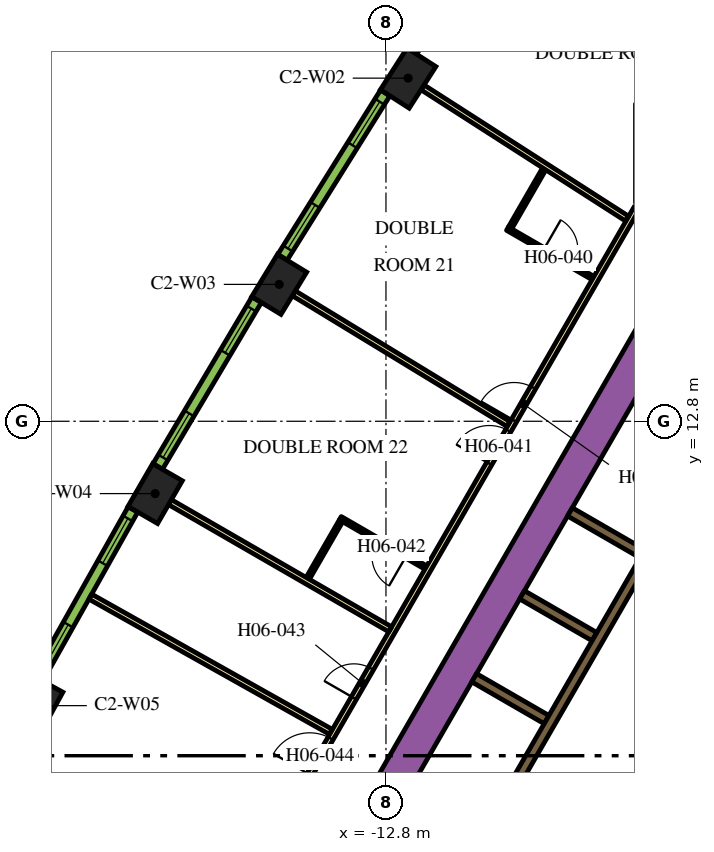
"""IFC4 building model, lengths in metres.
Left out: names, types, materials, properties, quantities, classifications, styles, units other than length and angle.
Written with IfcOpenShell. Run it as: python <this file> out.ifc"""

import sys

from ifc_helpers import new_model, si_unit, direction, frame, frame_2d, origin, origin_2d, place, context, subcontext, project, spatial, rectangle, extrude, element, fill, save


model = new_model("IFC4")
c1 = context("Model", 3, precision=1e-05, world=origin(), true_north=direction((0.0, 1.0)))
c2 = subcontext(c1, "Body", "Model", "MODEL_VIEW")
j1 = project(units=[si_unit("LENGTHUNIT", "METRE"), si_unit("PLANEANGLEUNIT", "RADIAN")], contexts=[c1])
p1 = place(None, origin())
s1 = spatial("IfcSite", under=j1, at=p1, CompositionType="ELEMENT")
p2 = place(p1, origin())
s2 = spatial("IfcBuilding", under=s1, at=p2, CompositionType="ELEMENT")
p3 = place(p2, frame((0.0, 0.0, 83.7)))
s3 = spatial("IfcBuildingStorey", under=s2, at=p3, CompositionType="ELEMENT", Elevation=83.7)
for number, where, z_axis, x_axis in (
    (1, (-12.217, 21.828, 0.0), (0.0, 0.0, 1.0), (-0.54, -0.842, 0.0)),
    (2, (-15.609, 16.402, 0.0), (0.0, 0.0, 1.0), (-0.52, -0.854, 0.0)),
    (3, (-18.874, 10.897, 0.0), (0.0, 0.0, 1.0), (-0.5, -0.866, 0.0)),
    (4, (-22.009, 5.317, 0.0), (0.0, 0.0, 1.0), (-0.48, -0.877, 0.0)),
):
    element("IfcColumn", number, at=place(p3, frame(where, z_axis=z_axis, x_axis=x_axis)), inside=s3, PredefinedType="COLUMN", context=c2, shape_type="SweptSolid", body=[
        extrude(rectangle(XDim=1.3, YDim=0.9, at=origin_2d()), origin(), (0.0, 0.0, 1.0), 3.9),
    ])
p4 = place(p3, frame((-15.36, -1.503, 0.0), z_axis=(0.0, 0.0, 1.0), x_axis=(0.50000389221, 0.866023156604, 0.0)))
e5 = element("IfcWall", 5, at=p4, inside=s3, PredefinedType="SOLIDWALL", context=c2, shape_type="SweptSolid", body=[
    extrude(rectangle(XDim=21.0, YDim=0.9, at=frame_2d((10.5, 0.0))), origin(), (0.0, 0.0, 1.0), 3.9),
])
p5 = place(p3, frame((-8.06, -1.311, 0.0), z_axis=(0.0, 0.0, 1.0), x_axis=(0.50000273126, 0.866023826885, 0.0)))
e6 = element("IfcWall", 6, at=p5, inside=s3, PredefinedType="SOLIDWALL", context=c2, shape_type="SweptSolid", body=[
    extrude(rectangle(XDim=10.33, YDim=0.25, at=frame_2d((5.165, 0.0))), origin(), (0.0, 0.0, 1.0), 3.9),
])
for number, where, z_axis, x_axis in (
    (7, (-8.574, 4.95, 0.0), (0.0, 0.0, 1.0), (-0.866, 0.5, 0.0)),
    (8, (-7.314, 7.132, 0.0), (0.0, 0.0, 1.0), (-0.866, 0.5, 0.0)),
):
    element("IfcWall", number, at=place(p3, frame(where, z_axis=z_axis, x_axis=x_axis)), inside=s3, PredefinedType="SOLIDWALL", context=c2, shape_type="SweptSolid", body=[
        extrude(rectangle(XDim=2.2, YDim=0.25, at=frame_2d((1.1, 0.0))), origin(), (0.0, 0.0, 1.0), 3.9),
    ])
p6 = place(p3, frame((-7.959, 10.415, 0.0), z_axis=(0.0, 0.0, 1.0), x_axis=(0.866020958405, -0.500007699544, 0.0)))
e9 = element("IfcWall", 9, at=p6, inside=s3, PredefinedType="SOLIDWALL", context=c2, shape_type="SweptSolid", body=[
    extrude(rectangle(XDim=4.1, YDim=0.25, at=frame_2d((2.05, 0.0))), origin(), (0.0, 0.0, 1.0), 3.9),
])
p7 = place(p3, frame((-6.008, 9.144, 0.0), z_axis=(0.0, 0.0, 1.0), x_axis=(-0.500006956611, -0.866021387346, 0.0)))
e10 = element("IfcWall", 10, at=p7, inside=s3, PredefinedType="SOLIDWALL", context=c2, shape_type="SweptSolid", body=[
    extrude(rectangle(XDim=9.83, YDim=0.25, at=frame_2d((4.915, 0.0))), origin(), (0.0, 0.0, 1.0), 3.9),
])
p8 = place(p7, frame((6.985, 0.0, 0.0)))
e11 = element("IfcOpeningElement", 11, at=p8, cuts=e10, PredefinedType="OPENING", context=c2, shape_type="SweptSolid", body=[
    extrude(rectangle(XDim=0.9, YDim=2.1, at=frame_2d((0.45, 1.05))), frame((0.0, 0.135, 0.0), z_axis=(0.0, -1.0, 0.0), x_axis=(1.0, 0.0, 0.0)), (0.0, 0.0, 1.0), 0.27),
])
p9 = place(p3, frame((-19.081, -3.9, 0.0), z_axis=(0.0, 0.0, 1.0), x_axis=(0.499998313975, 0.866026377209, 0.0)))
e12 = element("IfcWall", 12, at=p9, inside=s3, PredefinedType="PARTITIONING", context=c2, shape_type="SweptSolid", body=[
    extrude(rectangle(XDim=25.766, YDim=0.15, at=frame_2d((12.883, 0.0))), origin(), (0.0, 0.0, 1.0), 2.75),
])
p10 = place(p9, frame((19.306, 0.0, 0.0)))
e13 = element("IfcOpeningElement", 13, at=p10, cuts=e12, PredefinedType="OPENING", context=c2, shape_type="SweptSolid", body=[
    extrude(rectangle(XDim=1.0, YDim=2.1, at=frame_2d((0.5, 1.05))), frame((0.0, 0.085, 0.0), z_axis=(0.0, -1.0, 0.0), x_axis=(1.0, 0.0, 0.0)), (0.0, 0.0, 1.0), 0.17),
])
p11 = place(p9, frame((18.0, 0.0, 0.0)))
e14 = element("IfcOpeningElement", 14, at=p11, cuts=e12, PredefinedType="OPENING", context=c2, shape_type="SweptSolid", body=[
    extrude(rectangle(XDim=1.0, YDim=2.1, at=frame_2d((0.5, 1.05))), frame((0.0, 0.085, 0.0), z_axis=(0.0, -1.0, 0.0), x_axis=(1.0, 0.0, 0.0)), (0.0, 0.0, 1.0), 0.17),
])
p12 = place(p9, frame((10.874, 0.0, 0.0)))
e15 = element("IfcOpeningElement", 15, at=p12, cuts=e12, PredefinedType="OPENING", context=c2, shape_type="SweptSolid", body=[
    extrude(rectangle(XDim=0.9, YDim=2.1, at=frame_2d((0.45, 1.05))), frame((0.0, 0.085, 0.0), z_axis=(0.0, -1.0, 0.0), x_axis=(1.0, 0.0, 0.0)), (0.0, 0.0, 1.0), 0.17),
])
p13 = place(p9, frame((8.548, 0.0, 0.0)))
e16 = element("IfcOpeningElement", 16, at=p13, cuts=e12, PredefinedType="OPENING", context=c2, shape_type="SweptSolid", body=[
    extrude(rectangle(XDim=1.1, YDim=2.1, at=frame_2d((0.55, 1.05))), frame((0.0, 0.085, 0.0), z_axis=(0.0, -1.0, 0.0), x_axis=(1.0, 0.0, 0.0)), (0.0, 0.0, 1.0), 0.17),
])
p14 = place(p9, frame((0.18, 0.0, 0.0)))
e17 = element("IfcOpeningElement", 17, at=p14, cuts=e12, PredefinedType="OPENING", context=c2, shape_type="SweptSolid", body=[
    extrude(rectangle(XDim=1.0, YDim=2.1, at=frame_2d((0.5, 1.05))), frame((0.0, 0.085, 0.0), z_axis=(0.0, -1.0, 0.0), x_axis=(1.0, 0.0, 0.0)), (0.0, 0.0, 1.0), 0.17),
])
p15 = place(p3, frame((-20.581, 8.185, 0.0), z_axis=(0.0, 0.0, 1.0), x_axis=(0.871820720803, -0.489825102233, 0.0)))
e18 = element("IfcWall", 18, at=p15, inside=s3, PredefinedType="PARTITIONING", context=c2, shape_type="SweptSolid", body=[
    extrude(rectangle(XDim=7.257, YDim=0.15, at=frame_2d((3.628, 0.0))), origin(), (0.0, 0.0, 1.0), 2.75),
])
p16 = place(p3, frame((-18.484, 10.672, 0.0), z_axis=(0.0, 0.0, 1.0), x_axis=(0.866019162053, -0.50001081084, 0.0)))
e19 = element("IfcWall", 19, at=p16, inside=s3, PredefinedType="PARTITIONING", context=c2, shape_type="SweptSolid", body=[
    extrude(rectangle(XDim=6.694, YDim=0.15, at=frame_2d((3.347, 0.0))), origin(), (0.0, 0.0, 1.0), 2.75),
])
p17 = place(p3, frame((-15.225, 16.167, 0.0), z_axis=(0.0, 0.0, 1.0), x_axis=(0.854088713274, -0.520127359266, 0.0)))
e20 = element("IfcWall", 20, at=p17, inside=s3, PredefinedType="PARTITIONING", context=c2, shape_type="SweptSolid", body=[
    extrude(rectangle(XDim=6.611, YDim=0.15, at=frame_2d((3.305, 0.0))), origin(), (0.0, 0.0, 1.0), 2.75),
])
p18 = place(p3, frame((-11.838, 21.585, 0.0), z_axis=(0.0, 0.0, 1.0), x_axis=(0.841699322813, -0.539946525108, 0.0)))
e21 = element("IfcWall", 21, at=p18, inside=s3, PredefinedType="PARTITIONING", context=c2, shape_type="SweptSolid", body=[
    extrude(rectangle(XDim=6.392, YDim=0.15, at=frame_2d((3.196, 0.0))), origin(), (0.0, 0.0, 1.0), 2.75),
])
p19 = place(p3, frame((-8.326, 26.923, 0.0), z_axis=(0.0, 0.0, 1.0), x_axis=(0.828836601893, -0.5594907393, 0.0)))
e22 = element("IfcWall", 22, at=p19, inside=s3, PredefinedType="PARTITIONING", context=c2, shape_type="SweptSolid", body=[
    extrude(rectangle(XDim=8.909, YDim=0.15, at=frame_2d((4.455, 0.0))), origin(), (0.0, 0.0, 1.0), 2.75),
])
p20 = place(p3, frame((-9.603, 17.868, 0.0), z_axis=(0.0, 0.0, 1.0), x_axis=(0.866021400173, -0.500006934395, 0.0)))
e23 = element("IfcWall", 23, at=p20, inside=s3, PredefinedType="PARTITIONING", context=c2, shape_type="SweptSolid", body=[
    extrude(rectangle(XDim=2.6, YDim=0.1, at=frame_2d((1.3, 0.0))), origin(), (0.0, 0.0, 1.0), 2.75),
])
p21 = place(p20, frame((1.1, 0.0, 0.0)))
e24 = element("IfcOpeningElement", 24, at=p21, cuts=e23, PredefinedType="OPENING", context=c2, shape_type="SweptSolid", body=[
    extrude(rectangle(XDim=0.9, YDim=2.1, at=frame_2d((0.45, 1.05))), frame((0.0, 0.06, 0.0), z_axis=(0.0, -1.0, 0.0), x_axis=(1.0, 0.0, 0.0)), (0.0, 0.0, 1.0), 0.12),
])
p22 = place(p3, frame((-9.534, 17.886, 0.0), z_axis=(0.0, 0.0, 1.0), x_axis=(0.500041240653, 0.866001592173, 0.0)))
e25 = element("IfcWall", 25, at=p22, inside=s3, PredefinedType="PARTITIONING", context=c2, shape_type="SweptSolid", body=[
    extrude(rectangle(XDim=1.79, YDim=0.1, at=frame_2d((0.895, 0.0))), origin(), (0.0, 0.0, 1.0), 2.75),
])
p23 = place(p3, frame((-11.75, 8.949, 0.0), z_axis=(0.0, 0.0, 1.0), x_axis=(-0.865997922154, 0.500047596559, 0.0)))
e26 = element("IfcWall", 26, at=p23, inside=s3, PredefinedType="PARTITIONING", context=c2, shape_type="SweptSolid", body=[
    extrude(rectangle(XDim=2.6, YDim=0.1, at=frame_2d((1.3, 0.0))), origin(), (0.0, 0.0, 1.0), 2.75),
])
p24 = place(p23, frame((0.6, 0.0, 0.0)))
e27 = element("IfcOpeningElement", 27, at=p24, cuts=e26, PredefinedType="OPENING", context=c2, shape_type="SweptSolid", body=[
    extrude(rectangle(XDim=0.9, YDim=2.1, at=frame_2d((0.45, 1.05))), frame((0.0, 0.06, 0.0), z_axis=(0.0, -1.0, 0.0), x_axis=(1.0, 0.0, 0.0)), (0.0, 0.0, 1.0), 0.12),
])
p25 = place(p3, frame((-13.983, 10.181, 0.0), z_axis=(0.0, 0.0, 1.0), x_axis=(-0.499980071345, -0.866036909293, 0.0)))
e28 = element("IfcWall", 28, at=p25, inside=s3, PredefinedType="PARTITIONING", context=c2, shape_type="SweptSolid", body=[
    extrude(rectangle(XDim=1.75, YDim=0.1, at=frame_2d((0.875, 0.0))), origin(), (0.0, 0.0, 1.0), 2.75),
])
p26 = place(p3, frame((-9.311, 26.799, 0.0), z_axis=(0.0, 0.0, 1.0), x_axis=(-0.549741341923, -0.835334937005, 0.0)))
e29 = element("IfcWall", 29, at=p26, inside=s3, PredefinedType="SOLIDWALL", context=c2, shape_type="SweptSolid", body=[
    extrude(rectangle(XDim=5.1, YDim=0.29, at=frame_2d((2.55, 0.0))), origin(), (0.0, 0.0, 1.0), 3.65),
])
p27 = place(p26, frame((0.273, 0.0, 0.9)))
e30 = element("IfcOpeningElement", 30, at=p27, cuts=e29, PredefinedType="OPENING", context=c2, shape_type="SweptSolid", body=[
    extrude(rectangle(XDim=1.35, YDim=2.15, at=frame_2d((0.675, 1.075))), frame((0.0, 0.155, 0.0), z_axis=(0.0, -1.0, 0.0), x_axis=(1.0, 0.0, 0.0)), (0.0, 0.0, 1.0), 0.31),
])
p28 = place(p26, frame((3.478, 0.0, 0.9)))
e31 = element("IfcOpeningElement", 31, at=p28, cuts=e29, PredefinedType="OPENING", context=c2, shape_type="SweptSolid", body=[
    extrude(rectangle(XDim=1.35, YDim=2.15, at=frame_2d((0.675, 1.075))), frame((0.0, 0.155, 0.0), z_axis=(0.0, -1.0, 0.0), x_axis=(1.0, 0.0, 0.0)), (0.0, 0.0, 1.0), 0.31),
])
p29 = place(p3, frame((-12.82, 21.439, 0.0), z_axis=(0.0, 0.0, 1.0), x_axis=(-0.530072082134, -0.847952585787, 0.0)))
e32 = element("IfcWall", 32, at=p29, inside=s3, PredefinedType="SOLIDWALL", context=c2, shape_type="SweptSolid", body=[
    extrude(rectangle(XDim=5.1, YDim=0.29, at=frame_2d((2.55, 0.0))), origin(), (0.0, 0.0, 1.0), 3.65),
])
p30 = place(p29, frame((0.273, 0.0, 0.9)))
e33 = element("IfcOpeningElement", 33, at=p30, cuts=e32, PredefinedType="OPENING", context=c2, shape_type="SweptSolid", body=[
    extrude(rectangle(XDim=1.35, YDim=2.15, at=frame_2d((0.675, 1.075))), frame((0.0, 0.155, 0.0), z_axis=(0.0, -1.0, 0.0), x_axis=(1.0, 0.0, 0.0)), (0.0, 0.0, 1.0), 0.31),
])
p31 = place(p29, frame((3.478, 0.0, 0.9)))
e34 = element("IfcOpeningElement", 34, at=p31, cuts=e32, PredefinedType="OPENING", context=c2, shape_type="SweptSolid", body=[
    extrude(rectangle(XDim=1.35, YDim=2.15, at=frame_2d((0.675, 1.075))), frame((0.0, 0.155, 0.0), z_axis=(0.0, -1.0, 0.0), x_axis=(1.0, 0.0, 0.0)), (0.0, 0.0, 1.0), 0.31),
])
p32 = place(p3, frame((-16.203, 15.998, 0.0), z_axis=(0.0, 0.0, 1.0), x_axis=(-0.510054281659, -0.860142214847, 0.0)))
e35 = element("IfcWall", 35, at=p32, inside=s3, PredefinedType="SOLIDWALL", context=c2, shape_type="SweptSolid", body=[
    extrude(rectangle(XDim=5.101, YDim=0.29, at=frame_2d((2.55, 0.0))), origin(), (0.0, 0.0, 1.0), 3.65),
])
p33 = place(p32, frame((0.273, 0.0, 0.9)))
e36 = element("IfcOpeningElement", 36, at=p33, cuts=e35, PredefinedType="OPENING", context=c2, shape_type="SweptSolid", body=[
    extrude(rectangle(XDim=1.35, YDim=2.15, at=frame_2d((0.675, 1.075))), frame((0.0, 0.155, 0.0), z_axis=(0.0, -1.0, 0.0), x_axis=(1.0, 0.0, 0.0)), (0.0, 0.0, 1.0), 0.31),
])
p34 = place(p32, frame((3.478, 0.0, 0.9)))
e37 = element("IfcOpeningElement", 37, at=p34, cuts=e35, PredefinedType="OPENING", context=c2, shape_type="SweptSolid", body=[
    extrude(rectangle(XDim=1.35, YDim=2.15, at=frame_2d((0.675, 1.075))), frame((0.0, 0.155, 0.0), z_axis=(0.0, -1.0, 0.0), x_axis=(1.0, 0.0, 0.0)), (0.0, 0.0, 1.0), 0.31),
])
p35 = place(p3, frame((-19.458, 10.48, 0.0), z_axis=(0.0, 0.0, 1.0), x_axis=(-0.48983164787, -0.87181704316, 0.0)))
e38 = element("IfcWall", 38, at=p35, inside=s3, PredefinedType="SOLIDWALL", context=c2, shape_type="SweptSolid", body=[
    extrude(rectangle(XDim=5.1, YDim=0.29, at=frame_2d((2.55, 0.0))), origin(), (0.0, 0.0, 1.0), 3.65),
])
p36 = place(p35, frame((0.272, 0.0, 0.9)))
e39 = element("IfcOpeningElement", 39, at=p36, cuts=e38, PredefinedType="OPENING", context=c2, shape_type="SweptSolid", body=[
    extrude(rectangle(XDim=1.35, YDim=2.15, at=frame_2d((0.675, 1.075))), frame((0.0, 0.155, 0.0), z_axis=(0.0, -1.0, 0.0), x_axis=(1.0, 0.0, 0.0)), (0.0, 0.0, 1.0), 0.31),
])
p37 = place(p35, frame((3.478, 0.0, 0.9)))
e40 = element("IfcOpeningElement", 40, at=p37, cuts=e38, PredefinedType="OPENING", context=c2, shape_type="SweptSolid", body=[
    extrude(rectangle(XDim=1.35, YDim=2.15, at=frame_2d((0.675, 1.075))), frame((0.0, 0.155, 0.0), z_axis=(0.0, -1.0, 0.0), x_axis=(1.0, 0.0, 0.0)), (0.0, 0.0, 1.0), 0.31),
])
p38 = place(p10, origin())
e41 = element("IfcDoor", 41, at=p38, inside=s3, OperationType="SINGLE_SWING_LEFT", PredefinedType="DOOR", context=c2, shape_type="SweptSolid", body=[
    extrude(rectangle(XDim=1.0, YDim=2.1, at=frame_2d((0.5, 1.05))), frame((0.0, 0.025, 0.0), z_axis=(0.0, -1.0, 0.0), x_axis=(1.0, 0.0, 0.0)), (0.0, 0.0, 1.0), 0.05),
])
fill(e13, e41)
p39 = place(p21, origin())
e42 = element("IfcDoor", 42, at=p39, inside=s3, OperationType="SINGLE_SWING_RIGHT", PredefinedType="DOOR", context=c2, shape_type="SweptSolid", body=[
    extrude(rectangle(XDim=0.9, YDim=2.1, at=frame_2d((0.45, 1.05))), frame((0.0, 0.025, 0.0), z_axis=(0.0, -1.0, 0.0), x_axis=(1.0, 0.0, 0.0)), (0.0, 0.0, 1.0), 0.05),
])
fill(e24, e42)
p40 = place(p11, origin())
e43 = element("IfcDoor", 43, at=p40, inside=s3, OperationType="SINGLE_SWING_RIGHT", PredefinedType="DOOR", context=c2, shape_type="SweptSolid", body=[
    extrude(rectangle(XDim=1.0, YDim=2.1, at=frame_2d((0.5, 1.05))), frame((0.0, 0.025, 0.0), z_axis=(0.0, -1.0, 0.0), x_axis=(1.0, 0.0, 0.0)), (0.0, 0.0, 1.0), 0.05),
])
fill(e14, e43)
p41 = place(p24, origin())
e44 = element("IfcDoor", 44, at=p41, inside=s3, OperationType="SINGLE_SWING_LEFT", PredefinedType="DOOR", context=c2, shape_type="SweptSolid", body=[
    extrude(rectangle(XDim=0.9, YDim=2.1, at=frame_2d((0.45, 1.05))), frame((0.0, 0.025, 0.0), z_axis=(0.0, -1.0, 0.0), x_axis=(1.0, 0.0, 0.0)), (0.0, 0.0, 1.0), 0.05),
])
fill(e27, e44)
p42 = place(p12, origin())
e45 = element("IfcDoor", 45, at=p42, inside=s3, OperationType="SINGLE_SWING_LEFT", PredefinedType="DOOR", context=c2, shape_type="SweptSolid", body=[
    extrude(rectangle(XDim=0.9, YDim=2.1, at=frame_2d((0.45, 1.05))), frame((0.0, 0.025, 0.0), z_axis=(0.0, -1.0, 0.0), x_axis=(1.0, 0.0, 0.0)), (0.0, 0.0, 1.0), 0.05),
])
fill(e15, e45)
p43 = place(p13, origin())
e46 = element("IfcDoor", 46, at=p43, inside=s3, OperationType="SINGLE_SWING_RIGHT", PredefinedType="DOOR", context=c2, shape_type="SweptSolid", body=[
    extrude(rectangle(XDim=1.1, YDim=2.1, at=frame_2d((0.55, 1.05))), frame((0.0, 0.025, 0.0), z_axis=(0.0, -1.0, 0.0), x_axis=(1.0, 0.0, 0.0)), (0.0, 0.0, 1.0), 0.05),
])
fill(e16, e46)
p44 = place(p30, origin())
e47 = element("IfcWindow", 47, at=p44, inside=s3, PartitioningType="DOUBLE_PANEL_VERTICAL", PredefinedType="WINDOW", context=c2, shape_type="SweptSolid", body=[
    extrude(rectangle(XDim=1.35, YDim=2.15, at=frame_2d((0.675, 1.075))), frame((0.0, 0.015, 0.0), z_axis=(0.0, -1.0, 0.0), x_axis=(1.0, 0.0, 0.0)), (0.0, 0.0, 1.0), 0.06),
])
fill(e33, e47)
p45 = place(p31, origin())
e48 = element("IfcWindow", 48, at=p45, inside=s3, PartitioningType="DOUBLE_PANEL_VERTICAL", PredefinedType="WINDOW", context=c2, shape_type="SweptSolid", body=[
    extrude(rectangle(XDim=1.35, YDim=2.15, at=frame_2d((0.675, 1.075))), frame((0.0, 0.015, 0.0), z_axis=(0.0, -1.0, 0.0), x_axis=(1.0, 0.0, 0.0)), (0.0, 0.0, 1.0), 0.06),
])
fill(e34, e48)
p46 = place(p33, origin())
e49 = element("IfcWindow", 49, at=p46, inside=s3, PartitioningType="DOUBLE_PANEL_VERTICAL", PredefinedType="WINDOW", context=c2, shape_type="SweptSolid", body=[
    extrude(rectangle(XDim=1.35, YDim=2.15, at=frame_2d((0.675, 1.075))), frame((0.0, 0.015, 0.0), z_axis=(0.0, -1.0, 0.0), x_axis=(1.0, 0.0, 0.0)), (0.0, 0.0, 1.0), 0.06),
])
fill(e36, e49)
p47 = place(p34, origin())
e50 = element("IfcWindow", 50, at=p47, inside=s3, PartitioningType="DOUBLE_PANEL_VERTICAL", PredefinedType="WINDOW", context=c2, shape_type="SweptSolid", body=[
    extrude(rectangle(XDim=1.35, YDim=2.15, at=frame_2d((0.675, 1.075))), frame((0.0, 0.015, 0.0), z_axis=(0.0, -1.0, 0.0), x_axis=(1.0, 0.0, 0.0)), (0.0, 0.0, 1.0), 0.06),
])
fill(e37, e50)
p48 = place(p36, origin())
e51 = element("IfcWindow", 51, at=p48, inside=s3, PartitioningType="DOUBLE_PANEL_VERTICAL", PredefinedType="WINDOW", context=c2, shape_type="SweptSolid", body=[
    extrude(rectangle(XDim=1.35, YDim=2.15, at=frame_2d((0.675, 1.075))), frame((0.0, 0.015, 0.0), z_axis=(0.0, -1.0, 0.0), x_axis=(1.0, 0.0, 0.0)), (0.0, 0.0, 1.0), 0.06),
])
fill(e39, e51)
p49 = place(p37, origin())
e52 = element("IfcWindow", 52, at=p49, inside=s3, PartitioningType="DOUBLE_PANEL_VERTICAL", PredefinedType="WINDOW", context=c2, shape_type="SweptSolid", body=[
    extrude(rectangle(XDim=1.35, YDim=2.15, at=frame_2d((0.675, 1.075))), frame((0.0, 0.015, 0.0), z_axis=(0.0, -1.0, 0.0), x_axis=(1.0, 0.0, 0.0)), (0.0, 0.0, 1.0), 0.06),
])
fill(e40, e52)
save(model, sys.argv[1])
